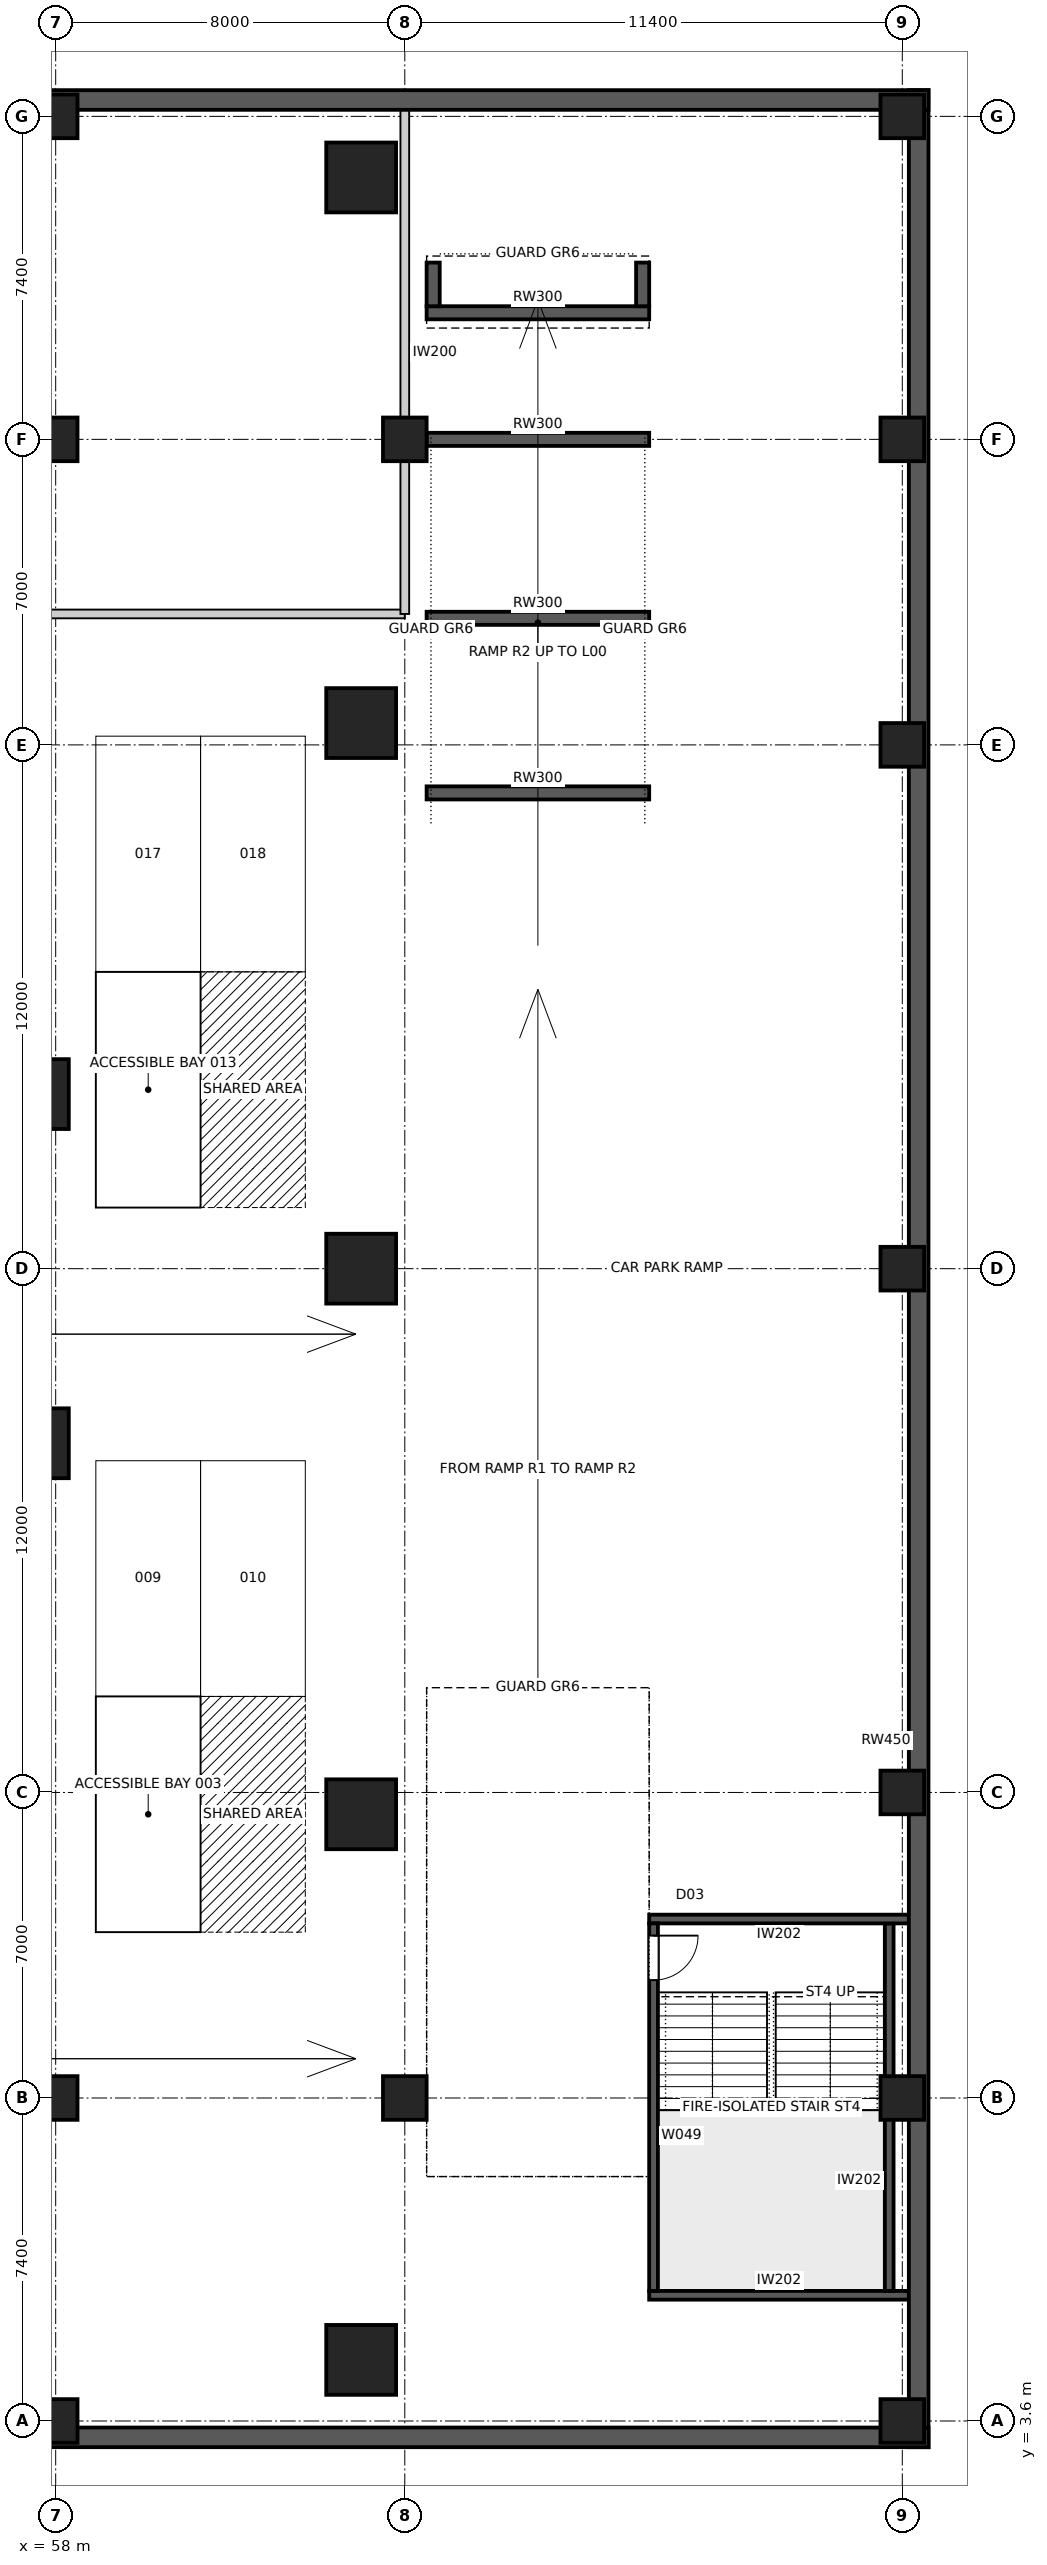
"""IFC4 building model, lengths in metres.
Left out: names, types, materials, properties, quantities, classifications, styles, units other than length and angle.
Written with IfcOpenShell. Run it as: python <this file> out.ifc"""

import sys

from ifc_helpers import new_model, si_unit, direction, frame, frame_2d, origin, origin_2d, place, context, subcontext, project, spatial, rectangle, extrude, element, fill, save


model = new_model("IFC4")
c1 = context("Model", 3, precision=1e-05, world=origin(), true_north=direction((0.0, 1.0)))
c2 = subcontext(c1, "Body", "Model", "MODEL_VIEW")
j1 = project(units=[si_unit("LENGTHUNIT", "METRE"), si_unit("PLANEANGLEUNIT", "RADIAN")], contexts=[c1])
p1 = place(None, origin())
s1 = spatial("IfcSite", under=j1, at=p1, CompositionType="ELEMENT")
p2 = place(p1, origin())
s2 = spatial("IfcBuilding", under=s1, at=p2, CompositionType="ELEMENT")
p3 = place(p2, frame((0.0, 0.0, -3.7)))
s3 = spatial("IfcBuildingStorey", under=s2, at=p3, CompositionType="ELEMENT", Elevation=-3.7)
for number, where, z_axis, x_axis in (
    (1, (65.0, 5.0, 0.0), (0.0, 0.0, 1.0), (1.0, 0.0, 0.0)),
    (2, (65.0, 17.5, 0.0), (0.0, 0.0, 1.0), (1.0, 0.0, 0.0)),
    (3, (65.0, 30.0, 0.0), (0.0, 0.0, 1.0), (1.0, 0.0, 0.0)),
    (4, (65.0, 42.5, 0.0), (0.0, 0.0, 1.0), (1.0, 0.0, 0.0)),
    (5, (65.0, 55.0, 0.0), (0.0, 0.0, 1.0), (1.0, 0.0, 0.0)),
):
    element("IfcColumn", number, at=place(p3, frame(where, z_axis=z_axis, x_axis=x_axis)), inside=s3, PredefinedType="COLUMN", context=c2, shape_type="SweptSolid", body=[
        extrude(rectangle(XDim=1.6, YDim=1.6, at=origin_2d()), origin(), (0.0, 0.0, 1.0), 3.7),
    ])
for number, where, z_axis, x_axis in (
    (6, (58.0, 3.6, 0.0), (0.0, 0.0, 1.0), (1.0, 0.0, 0.0)),
    (7, (58.0, 11.0, 0.0), (0.0, 0.0, 1.0), (1.0, 0.0, 0.0)),
    (8, (58.0, 49.0, 0.0), (0.0, 0.0, 1.0), (1.0, 0.0, 0.0)),
    (9, (58.0, 56.4, 0.0), (0.0, 0.0, 1.0), (1.0, 0.0, 0.0)),
    (10, (66.0, 11.0, 0.0), (0.0, 0.0, 1.0), (1.0, 0.0, 0.0)),
    (11, (66.0, 49.0, 0.0), (0.0, 0.0, 1.0), (1.0, 0.0, 0.0)),
    (12, (77.4, 3.6, 0.0), (0.0, 0.0, 1.0), (1.0, 0.0, 0.0)),
    (13, (77.4, 11.0, 0.0), (0.0, 0.0, 1.0), (1.0, 0.0, 0.0)),
    (14, (77.4, 18.0, 0.0), (0.0, 0.0, 1.0), (1.0, 0.0, 0.0)),
    (15, (77.4, 30.0, 0.0), (0.0, 0.0, 1.0), (1.0, 0.0, 0.0)),
    (16, (77.4, 42.0, 0.0), (0.0, 0.0, 1.0), (1.0, 0.0, 0.0)),
    (17, (77.4, 49.0, 0.0), (0.0, 0.0, 1.0), (1.0, 0.0, 0.0)),
    (18, (77.4, 56.4, 0.0), (0.0, 0.0, 1.0), (1.0, 0.0, 0.0)),
):
    element("IfcColumn", number, at=place(p3, frame(where, z_axis=z_axis, x_axis=x_axis)), inside=s3, PredefinedType="COLUMN", context=c2, shape_type="SweptSolid", body=[
        extrude(rectangle(XDim=1.0, YDim=1.0, at=origin_2d()), origin(), (0.0, 0.0, 1.0), 3.7),
    ])
for number, where, z_axis, x_axis in (
    (19, (57.5, 26.0, 0.0), (0.0, 0.0, 1.0), (1.0, 0.0, 0.0)),
    (20, (57.5, 34.0, 0.0), (0.0, 0.0, 1.0), (1.0, 0.0, 0.0)),
):
    element("IfcColumn", number, at=place(p3, frame(where, z_axis=z_axis, x_axis=x_axis)), inside=s3, PredefinedType="COLUMN", context=c2, shape_type="SweptSolid", body=[
        extrude(rectangle(XDim=1.6, YDim=1.6, at=origin_2d()), origin(), (0.0, 0.0, 1.0), 3.7),
    ])
p4 = place(p3, frame((2.0, 3.225, 0.0), z_axis=(0.0, 0.0, 1.0), x_axis=(1.0, 0.0, 0.0)))
e21 = element("IfcWall", 21, at=p4, inside=s3, PredefinedType="SHEAR", context=c2, shape_type="SweptSolid", body=[
    extrude(rectangle(XDim=76.0, YDim=0.45, at=frame_2d((38.0, 0.0))), origin(), (0.0, 0.0, 1.0), 3.7),
])
p5 = place(p3, frame((77.775, 3.0, 0.0), z_axis=(0.0, 0.0, 1.0), x_axis=(0.0, 1.0, 0.0)))
e22 = element("IfcWall", 22, at=p5, inside=s3, PredefinedType="SHEAR", context=c2, shape_type="SweptSolid", body=[
    extrude(rectangle(XDim=54.0, YDim=0.45, at=frame_2d((27.0, 0.0))), origin(), (0.0, 0.0, 1.0), 3.7),
])
p6 = place(p3, frame((78.0, 56.775, 0.0), z_axis=(0.0, 0.0, 1.0), x_axis=(-1.0, 0.0, 0.0)))
e23 = element("IfcWall", 23, at=p6, inside=s3, PredefinedType="SHEAR", context=c2, shape_type="SweptSolid", body=[
    extrude(rectangle(XDim=76.0, YDim=0.45, at=frame_2d((38.0, 0.0))), origin(), (0.0, 0.0, 1.0), 3.7),
])
p7 = place(p3, frame((71.6, 6.48, 0.0), z_axis=(0.0, 0.0, 1.0), x_axis=(1.0, 0.0, 0.0)))
e24 = element("IfcWall", 24, at=p7, inside=s3, PredefinedType="SOLIDWALL", context=c2, shape_type="SweptSolid", body=[
    extrude(rectangle(XDim=5.95, YDim=0.2, at=frame_2d((2.975, 0.0))), origin(), (0.0, 0.0, 1.0), 3.35),
])
p8 = place(p3, frame((77.1, 6.58, 0.0), z_axis=(0.0, 0.0, 1.0), x_axis=(0.0, 1.0, 0.0)))
e25 = element("IfcWall", 25, at=p8, inside=s3, PredefinedType="SOLIDWALL", context=c2, shape_type="SweptSolid", body=[
    extrude(rectangle(XDim=8.42, YDim=0.2, at=frame_2d((4.21, 0.0))), origin(), (0.0, 0.0, 1.0), 3.35),
])
p9 = place(p3, frame((77.55, 15.1, 0.0), z_axis=(0.0, 0.0, 1.0), x_axis=(-1.0, 0.0, 0.0)))
e26 = element("IfcWall", 26, at=p9, inside=s3, PredefinedType="SOLIDWALL", context=c2, shape_type="SweptSolid", body=[
    extrude(rectangle(XDim=5.95, YDim=0.2, at=frame_2d((2.975, 0.0))), origin(), (0.0, 0.0, 1.0), 3.35),
])
p10 = place(p3, frame((71.7, 15.0, 0.0), z_axis=(0.0, 0.0, 1.0), x_axis=(0.0, -1.0, 0.0)))
e27 = element("IfcWall", 27, at=p10, inside=s3, PredefinedType="SOLIDWALL", context=c2, shape_type="SweptSolid", body=[
    extrude(rectangle(XDim=8.42, YDim=0.2, at=frame_2d((4.21, 0.0))), origin(), (0.0, 0.0, 1.0), 3.35),
])
p11 = place(p10, frame((0.28, 0.0, 0.0)))
e28 = element("IfcOpeningElement", 28, at=p11, cuts=e27, PredefinedType="OPENING", context=c2, shape_type="SweptSolid", body=[
    extrude(rectangle(XDim=1.02, YDim=2.1, at=frame_2d((0.51, 1.05))), frame((0.0, 0.11, 0.0), z_axis=(0.0, -1.0, 0.0), x_axis=(1.0, 0.0, 0.0)), (0.0, 0.0, 1.0), 0.22),
])
p12 = place(p3, frame((32.0, 45.0, 0.0), z_axis=(0.0, 0.0, 1.0), x_axis=(1.0, 0.0, 0.0)))
e29 = element("IfcWall", 29, at=p12, inside=s3, PredefinedType="PARTITIONING", context=c2, shape_type="SweptSolid", body=[
    extrude(rectangle(XDim=34.0, YDim=0.2, at=frame_2d((17.0, 0.0))), origin(), (0.0, 0.0, 1.0), 3.35),
])
p13 = place(p12, frame((22.465, 0.0, 0.0)))
e30 = element("IfcOpeningElement", 30, at=p13, cuts=e29, PredefinedType="OPENING", context=c2, shape_type="SweptSolid", body=[
    extrude(rectangle(XDim=1.02, YDim=2.1, at=frame_2d((0.51, 1.05))), frame((0.0, 0.11, 0.0), z_axis=(0.0, -1.0, 0.0), x_axis=(1.0, 0.0, 0.0)), (0.0, 0.0, 1.0), 0.22),
])
p14 = place(p12, frame((5.515, 0.0, 0.0)))
e31 = element("IfcOpeningElement", 31, at=p14, cuts=e29, PredefinedType="OPENING", context=c2, shape_type="SweptSolid", body=[
    extrude(rectangle(XDim=1.02, YDim=2.1, at=frame_2d((0.51, 1.05))), frame((0.0, 0.11, 0.0), z_axis=(0.0, -1.0, 0.0), x_axis=(1.0, 0.0, 0.0)), (0.0, 0.0, 1.0), 0.22),
])
p15 = place(p3, frame((66.0, 57.0, 0.0), z_axis=(0.0, 0.0, 1.0), x_axis=(0.0, -1.0, 0.0)))
e32 = element("IfcWall", 32, at=p15, inside=s3, PredefinedType="PARTITIONING", context=c2, shape_type="SweptSolid", body=[
    extrude(rectangle(XDim=12.0, YDim=0.2, at=frame_2d((6.0, 0.0))), origin(), (0.0, 0.0, 1.0), 3.35),
])
p16 = place(p3, frame((66.5, 40.9, 0.0), z_axis=(0.0, 0.0, 1.0), x_axis=(1.0, 0.0, 0.0)))
e33 = element("IfcWall", 33, at=p16, inside=s3, PredefinedType="SHEAR", context=c2, shape_type="SweptSolid", body=[
    extrude(rectangle(XDim=5.1, YDim=0.3, at=frame_2d((2.55, 0.0))), origin(), (0.0, 0.0, 1.0), 0.59),
])
p17 = place(p3, frame((66.5, 44.9, 0.0), z_axis=(0.0, 0.0, 1.0), x_axis=(1.0, 0.0, 0.0)))
e34 = element("IfcWall", 34, at=p17, inside=s3, PredefinedType="SHEAR", context=c2, shape_type="SweptSolid", body=[
    extrude(rectangle(XDim=5.1, YDim=0.3, at=frame_2d((2.55, 0.0))), origin(), (0.0, 0.0, 1.0), 1.59),
])
p18 = place(p3, frame((66.5, 49.0, 0.0), z_axis=(0.0, 0.0, 1.0), x_axis=(1.0, 0.0, 0.0)))
e35 = element("IfcWall", 35, at=p18, inside=s3, PredefinedType="SHEAR", context=c2, shape_type="SweptSolid", body=[
    extrude(rectangle(XDim=5.1, YDim=0.3, at=frame_2d((2.55, 0.0))), origin(), (0.0, 0.0, 1.0), 2.615),
])
p19 = place(p3, frame((66.5, 51.9, -3.7), z_axis=(0.0, 0.0, 1.0), x_axis=(1.0, 0.0, 0.0)))
e36 = element("IfcWall", 36, at=p19, inside=s3, PredefinedType="SHEAR", context=c2, shape_type="SweptSolid", body=[
    extrude(rectangle(XDim=5.1, YDim=0.3, at=frame_2d((2.55, 0.0))), origin(), (0.0, 0.0, 1.0), 6.977),
])
for number, where, z_axis, x_axis in (
    (37, (66.65, 52.05, -3.7), (0.0, 0.0, 1.0), (0.0, 1.0, 0.0)),
    (38, (71.45, 52.05, -3.7), (0.0, 0.0, 1.0), (0.0, 1.0, 0.0)),
):
    element("IfcWall", number, at=place(p3, frame(where, z_axis=z_axis, x_axis=x_axis)), inside=s3, PredefinedType="SHEAR", context=c2, shape_type="SweptSolid", body=[
        extrude(rectangle(XDim=1.0, YDim=0.3, at=frame_2d((0.5, 0.0))), origin(), (0.0, 0.0, 1.0), 7.014),
    ])
p20 = place(p11, origin())
e39 = element("IfcDoor", 39, at=p20, inside=s3, OperationType="SINGLE_SWING_LEFT", PredefinedType="DOOR", context=c2, shape_type="SweptSolid", body=[
    extrude(rectangle(XDim=1.02, YDim=2.1, at=frame_2d((0.51, 1.05))), frame((0.0, 0.025, 0.0), z_axis=(0.0, -1.0, 0.0), x_axis=(1.0, 0.0, 0.0)), (0.0, 0.0, 1.0), 0.05),
])
fill(e28, e39)
save(model, sys.argv[1])
